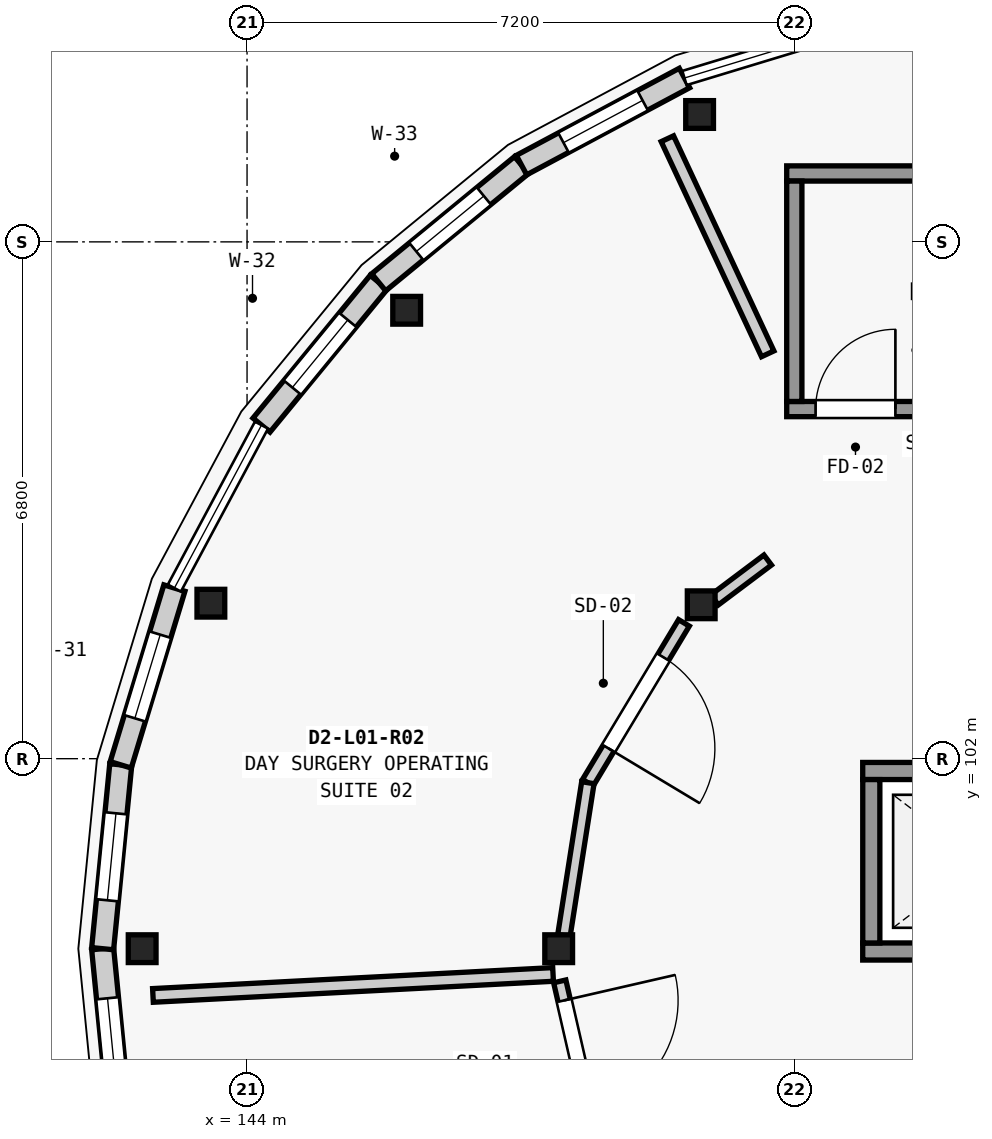
"""IFC4 building model, lengths in metres.
Left out: names, types, materials, properties, quantities, classifications, styles, units other than length and angle.
Written with IfcOpenShell. Run it as: python <this file> out.ifc"""

import sys

from ifc_helpers import new_model, si_unit, direction, frame, frame_2d, origin, origin_2d, place, context, subcontext, project, spatial, rectangle, extrude, element, fill, save


model = new_model("IFC4")
c1 = context("Model", 3, precision=1e-05, world=origin(), true_north=direction((0.0, 1.0)))
c2 = subcontext(c1, "Body", "Model", "MODEL_VIEW")
j1 = project(units=[si_unit("LENGTHUNIT", "METRE"), si_unit("PLANEANGLEUNIT", "RADIAN")], contexts=[c1])
p1 = place(None, origin())
s1 = spatial("IfcSite", under=j1, at=p1, CompositionType="ELEMENT")
p2 = place(p1, origin())
s2 = spatial("IfcBuilding", under=s1, at=p2, CompositionType="ELEMENT")
p3 = place(p2, frame((0.0, 0.0, 4.55)))
s3 = spatial("IfcBuildingStorey", under=s2, at=p3, CompositionType="ELEMENT", Elevation=4.55)
for number, where, z_axis, x_axis in (
    (1, (149.954, 110.476, 0.0), (0.0, 0.0, 1.0), (1.0, 0.0, 0.0)),
    (2, (146.1, 107.9, 0.0), (0.0, 0.0, 1.0), (1.0, 0.0, 0.0)),
    (3, (143.524, 104.046, 0.0), (0.0, 0.0, 1.0), (1.0, 0.0, 0.0)),
    (4, (142.62, 99.5, 0.0), (0.0, 0.0, 1.0), (1.0, 0.0, 0.0)),
    (5, (149.975, 104.025, 0.0), (0.0, 0.0, 1.0), (1.0, 0.0, 0.0)),
    (6, (148.1, 99.5, 0.0), (0.0, 0.0, 1.0), (1.0, 0.0, 0.0)),
):
    element("IfcColumn", number, at=place(p3, frame(where, z_axis=z_axis, x_axis=x_axis)), inside=s3, PredefinedType="COLUMN", context=c2, shape_type="SweptSolid", body=[
        extrude(rectangle(XDim=0.365, YDim=0.365, at=origin_2d()), origin(), (0.0, 0.0, 1.0), 4.2),
    ])
p4 = place(p3, frame((142.338, 97.081, 0.0), z_axis=(0.0, 0.0, 1.0), x_axis=(-0.097832820839, 0.995202863323, 0.0)))
e7 = element("IfcWall", 7, at=p4, inside=s3, PredefinedType="ELEMENTEDWALL", context=c2, shape_type="SweptSolid", body=[
    extrude(rectangle(XDim=2.431, YDim=0.29, at=frame_2d((1.215, 0.0))), origin(), (0.0, 0.0, 1.0), 3.309),
])
p5 = place(p4, frame((0.655, 0.0, 0.85)))
e8 = element("IfcOpeningElement", 8, at=p5, cuts=e7, PredefinedType="OPENING", context=c2, shape_type="SweptSolid", body=[
    extrude(rectangle(XDim=1.12, YDim=1.65, at=frame_2d((0.56, 0.825))), frame((0.0, 0.155, 0.0), z_axis=(0.0, -1.0, 0.0), x_axis=(1.0, 0.0, 0.0)), (0.0, 0.0, 1.0), 0.31),
])
p6 = place(p3, frame((142.1, 99.5, 0.0), z_axis=(0.0, 0.0, 1.0), x_axis=(0.097832820839, 0.995202863323, 0.0)))
e9 = element("IfcWall", 9, at=p6, inside=s3, PredefinedType="ELEMENTEDWALL", context=c2, shape_type="SweptSolid", body=[
    extrude(rectangle(XDim=2.431, YDim=0.29, at=frame_2d((1.215, 0.0))), origin(), (0.0, 0.0, 1.0), 3.309),
])
p7 = place(p6, frame((0.64, 0.0, 0.85)))
e10 = element("IfcOpeningElement", 10, at=p7, cuts=e9, PredefinedType="OPENING", context=c2, shape_type="SweptSolid", body=[
    extrude(rectangle(XDim=1.15, YDim=1.4, at=frame_2d((0.575, 0.7))), frame((0.0, 0.155, 0.0), z_axis=(0.0, -1.0, 0.0), x_axis=(1.0, 0.0, 0.0)), (0.0, 0.0, 1.0), 0.31),
])
p8 = place(p3, frame((142.338, 101.919, 0.0), z_axis=(0.0, 0.0, 1.0), x_axis=(0.290442193951, 0.956892539407, 0.0)))
e11 = element("IfcWall", 11, at=p8, inside=s3, PredefinedType="ELEMENTEDWALL", context=c2, shape_type="SweptSolid", body=[
    extrude(rectangle(XDim=2.431, YDim=0.29, at=frame_2d((1.215, 0.0))), origin(), (0.0, 0.0, 1.0), 3.309),
])
p9 = place(p8, frame((0.64, 0.0, 0.85)))
e12 = element("IfcOpeningElement", 12, at=p9, cuts=e11, PredefinedType="OPENING", context=c2, shape_type="SweptSolid", body=[
    extrude(rectangle(XDim=1.15, YDim=1.7, at=frame_2d((0.575, 0.85))), frame((0.0, 0.155, 0.0), z_axis=(0.0, -1.0, 0.0), x_axis=(1.0, 0.0, 0.0)), (0.0, 0.0, 1.0), 0.31),
])
p10 = place(p3, frame((144.19, 106.389, 0.0), z_axis=(0.0, 0.0, 1.0), x_axis=(0.634347392822, 0.773048113134, 0.0)))
e13 = element("IfcWall", 13, at=p10, inside=s3, PredefinedType="ELEMENTEDWALL", context=c2, shape_type="SweptSolid", body=[
    extrude(rectangle(XDim=2.431, YDim=0.29, at=frame_2d((1.215, 0.0))), origin(), (0.0, 0.0, 1.0), 3.309),
])
p11 = place(p10, frame((0.64, 0.0, 0.85)))
e14 = element("IfcOpeningElement", 14, at=p11, cuts=e13, PredefinedType="OPENING", context=c2, shape_type="SweptSolid", body=[
    extrude(rectangle(XDim=1.15, YDim=2.0, at=frame_2d((0.575, 1.0))), frame((0.0, 0.155, 0.0), z_axis=(0.0, -1.0, 0.0), x_axis=(1.0, 0.0, 0.0)), (0.0, 0.0, 1.0), 0.31),
])
p12 = place(p3, frame((145.732, 108.268, 0.0), z_axis=(0.0, 0.0, 1.0), x_axis=(0.773048113134, 0.634347392822, 0.0)))
e15 = element("IfcWall", 15, at=p12, inside=s3, PredefinedType="ELEMENTEDWALL", context=c2, shape_type="SweptSolid", body=[
    extrude(rectangle(XDim=2.431, YDim=0.29, at=frame_2d((1.215, 0.0))), origin(), (0.0, 0.0, 1.0), 3.309),
])
p13 = place(p12, frame((0.64, 0.0, 0.85)))
e16 = element("IfcOpeningElement", 16, at=p13, cuts=e15, PredefinedType="OPENING", context=c2, shape_type="SweptSolid", body=[
    extrude(rectangle(XDim=1.15, YDim=2.25, at=frame_2d((0.575, 1.125))), frame((0.0, 0.155, 0.0), z_axis=(0.0, -1.0, 0.0), x_axis=(1.0, 0.0, 0.0)), (0.0, 0.0, 1.0), 0.31),
])
p14 = place(p3, frame((147.611, 109.81, 0.0), z_axis=(0.0, 0.0, 1.0), x_axis=(0.881902152415, 0.471432490996, 0.0)))
e17 = element("IfcWall", 17, at=p14, inside=s3, PredefinedType="ELEMENTEDWALL", context=c2, shape_type="SweptSolid", body=[
    extrude(rectangle(XDim=2.431, YDim=0.29, at=frame_2d((1.215, 0.0))), origin(), (0.0, 0.0, 1.0), 3.309),
])
p15 = place(p14, frame((0.626, 0.0, 0.85)))
e18 = element("IfcOpeningElement", 18, at=p15, cuts=e17, PredefinedType="OPENING", context=c2, shape_type="SweptSolid", body=[
    extrude(rectangle(XDim=1.18, YDim=1.55, at=frame_2d((0.59, 0.775))), frame((0.0, 0.155, 0.0), z_axis=(0.0, -1.0, 0.0), x_axis=(1.0, 0.0, 0.0)), (0.0, 0.0, 1.0), 0.31),
])
p16 = place(p3, frame((151.1, 106.6, 0.0), z_axis=(0.0, 0.0, 1.0), x_axis=(1.0, 0.0, 0.0)))
e19 = element("IfcWall", 19, at=p16, inside=s3, PredefinedType="SHEAR", context=c2, shape_type="SweptSolid", body=[
    extrude(rectangle(XDim=6.8, YDim=0.2, at=frame_2d((3.4, 0.0))), origin(), (0.0, 0.0, 1.0), 3.955),
])
p17 = place(p16, frame((0.38, 0.0, 0.0)))
e20 = element("IfcOpeningElement", 20, at=p17, cuts=e19, PredefinedType="OPENING", context=c2, shape_type="SweptSolid", body=[
    extrude(rectangle(XDim=1.05, YDim=2.15, at=frame_2d((0.525, 1.075))), frame((0.0, 0.11, 0.0), z_axis=(0.0, -1.0, 0.0), x_axis=(1.0, 0.0, 0.0)), (0.0, 0.0, 1.0), 0.22),
])
p18 = place(p3, frame((151.1, 109.7, 0.0), z_axis=(0.0, 0.0, 1.0), x_axis=(1.0, 0.0, 0.0)))
e21 = element("IfcWall", 21, at=p18, inside=s3, PredefinedType="SHEAR", context=c2, shape_type="SweptSolid", body=[
    extrude(rectangle(XDim=6.8, YDim=0.2, at=frame_2d((3.4, 0.0))), origin(), (0.0, 0.0, 1.0), 3.955),
])
p19 = place(p3, frame((151.2, 106.7, 0.0), z_axis=(0.0, 0.0, 1.0), x_axis=(0.0, 1.0, 0.0)))
e22 = element("IfcWall", 22, at=p19, inside=s3, PredefinedType="SHEAR", context=c2, shape_type="SweptSolid", body=[
    extrude(rectangle(XDim=2.9, YDim=0.2, at=frame_2d((1.45, 0.0))), origin(), (0.0, 0.0, 1.0), 3.955),
])
p20 = place(p3, frame((152.1, 99.463, 0.0), z_axis=(0.0, 0.0, 1.0), x_axis=(1.0, 0.0, 0.0)))
e23 = element("IfcWall", 23, at=p20, inside=s3, PredefinedType="SHEAR", context=c2, shape_type="SweptSolid", body=[
    extrude(rectangle(XDim=3.1, YDim=0.225, at=frame_2d((1.55, 0.0))), origin(), (0.0, 0.0, 1.0), 3.955),
])
p21 = place(p20, frame((0.9, 0.0, 0.0)))
e24 = element("IfcOpeningElement", 24, at=p21, cuts=e23, PredefinedType="OPENING", context=c2, shape_type="SweptSolid", body=[
    extrude(rectangle(XDim=1.3, YDim=2.2, at=frame_2d((0.65, 1.1))), frame((0.0, 0.123, 0.0), z_axis=(0.0, -1.0, 0.0), x_axis=(1.0, 0.0, 0.0)), (0.0, 0.0, 1.0), 0.245),
])
p22 = place(p3, frame((152.1, 101.838, 0.0), z_axis=(0.0, 0.0, 1.0), x_axis=(1.0, 0.0, 0.0)))
e25 = element("IfcWall", 25, at=p22, inside=s3, PredefinedType="SHEAR", context=c2, shape_type="SweptSolid", body=[
    extrude(rectangle(XDim=3.1, YDim=0.225, at=frame_2d((1.55, 0.0))), origin(), (0.0, 0.0, 1.0), 3.955),
])
p23 = place(p3, frame((152.213, 99.575, 0.0), z_axis=(0.0, 0.0, 1.0), x_axis=(0.0, 1.0, 0.0)))
e26 = element("IfcWall", 26, at=p23, inside=s3, PredefinedType="SHEAR", context=c2, shape_type="SweptSolid", body=[
    extrude(rectangle(XDim=2.15, YDim=0.225, at=frame_2d((1.075, 0.0))), origin(), (0.0, 0.0, 1.0), 3.955),
])
p24 = place(p3, frame((150.85, 107.327, 0.0), z_axis=(0.0, 0.0, 1.0), x_axis=(-0.422718541288, 0.906261019162, 0.0)))
e27 = element("IfcWall", 27, at=p24, inside=s3, PredefinedType="PARTITIONING", context=c2, shape_type="SweptSolid", body=[
    extrude(rectangle(XDim=3.123, YDim=0.18, at=frame_2d((1.562, 0.0))), origin(), (0.0, 0.0, 1.0), 3.284),
])
p25 = place(p3, frame((148.026, 99.161, 0.0), z_axis=(0.0, 0.0, 1.0), x_axis=(-0.998629447921, -0.052337613105, 0.0)))
e28 = element("IfcWall", 28, at=p25, inside=s3, PredefinedType="PARTITIONING", context=c2, shape_type="SweptSolid", body=[
    extrude(rectangle(XDim=5.271, YDim=0.18, at=frame_2d((2.636, 0.0))), origin(), (0.0, 0.0, 1.0), 3.284),
])
p26 = place(p3, frame((150.85, 104.614, 0.0), z_axis=(0.0, 0.0, 1.0), x_axis=(-0.799731853613, -0.600357362174, 0.0)))
e29 = element("IfcWall", 29, at=p26, inside=s3, PredefinedType="PARTITIONING", context=c2, shape_type="SweptSolid", body=[
    extrude(rectangle(XDim=0.874, YDim=0.165, at=frame_2d((0.437, 0.0))), origin(), (0.0, 0.0, 1.0), 3.284),
])
p27 = place(p3, frame((149.748, 103.787, 0.0), z_axis=(0.0, 0.0, 1.0), x_axis=(-0.515197917959, -0.857071237022, 0.0)))
e30 = element("IfcWall", 30, at=p27, inside=s3, PredefinedType="PARTITIONING", context=c2, shape_type="SweptSolid", body=[
    extrude(rectangle(XDim=2.454, YDim=0.165, at=frame_2d((1.227, 0.0))), origin(), (0.0, 0.0, 1.0), 3.284),
])
p28 = place(p27, frame((0.527, 0.0, 0.0)))
e31 = element("IfcOpeningElement", 31, at=p28, cuts=e30, PredefinedType="OPENING", context=c2, shape_type="SweptSolid", body=[
    extrude(rectangle(XDim=1.4, YDim=2.25, at=frame_2d((0.7, 1.125))), frame((0.0, 0.093, 0.0), z_axis=(0.0, -1.0, 0.0), x_axis=(1.0, 0.0, 0.0)), (0.0, 0.0, 1.0), 0.185),
])
p29 = place(p3, frame((148.484, 101.684, 0.0), z_axis=(0.0, 0.0, 1.0), x_axis=(-0.154797832722, -0.98794616806, 0.0)))
e32 = element("IfcWall", 32, at=p29, inside=s3, PredefinedType="PARTITIONING", context=c2, shape_type="SweptSolid", body=[
    extrude(rectangle(XDim=2.034, YDim=0.165, at=frame_2d((1.017, 0.0))), origin(), (0.0, 0.0, 1.0), 3.284),
])
p30 = place(p3, frame((148.114, 99.07, 0.0), z_axis=(0.0, 0.0, 1.0), x_axis=(0.223512984269, -0.974700952017, 0.0)))
e33 = element("IfcWall", 33, at=p30, inside=s3, PredefinedType="PARTITIONING", context=c2, shape_type="SweptSolid", body=[
    extrude(rectangle(XDim=2.013, YDim=0.165, at=frame_2d((1.007, 0.0))), origin(), (0.0, 0.0, 1.0), 3.284),
])
p31 = place(p30, frame((0.257, 0.0, 0.0)))
e34 = element("IfcOpeningElement", 34, at=p31, cuts=e33, PredefinedType="OPENING", context=c2, shape_type="SweptSolid", body=[
    extrude(rectangle(XDim=1.5, YDim=2.3, at=frame_2d((0.75, 1.15))), frame((0.0, 0.093, 0.0), z_axis=(0.0, -1.0, 0.0), x_axis=(1.0, 0.0, 0.0)), (0.0, 0.0, 1.0), 0.185),
])
p32 = place(p5, origin())
e35 = element("IfcWindow", 35, at=p32, inside=s3, PartitioningType="SINGLE_PANEL", PredefinedType="WINDOW", context=c2, shape_type="SweptSolid", body=[
    extrude(rectangle(XDim=1.12, YDim=1.65, at=frame_2d((0.56, 0.825))), frame((0.0, 0.03, 0.0), z_axis=(0.0, -1.0, 0.0), x_axis=(1.0, 0.0, 0.0)), (0.0, 0.0, 1.0), 0.06),
])
fill(e8, e35)
p33 = place(p7, origin())
e36 = element("IfcWindow", 36, at=p33, inside=s3, PartitioningType="SINGLE_PANEL", PredefinedType="WINDOW", context=c2, shape_type="SweptSolid", body=[
    extrude(rectangle(XDim=1.15, YDim=1.4, at=frame_2d((0.575, 0.7))), frame((0.0, 0.03, 0.0), z_axis=(0.0, -1.0, 0.0), x_axis=(1.0, 0.0, 0.0)), (0.0, 0.0, 1.0), 0.06),
])
fill(e10, e36)
p34 = place(p9, origin())
e37 = element("IfcWindow", 37, at=p34, inside=s3, PartitioningType="SINGLE_PANEL", PredefinedType="WINDOW", context=c2, shape_type="SweptSolid", body=[
    extrude(rectangle(XDim=1.15, YDim=1.7, at=frame_2d((0.575, 0.85))), frame((0.0, 0.03, 0.0), z_axis=(0.0, -1.0, 0.0), x_axis=(1.0, 0.0, 0.0)), (0.0, 0.0, 1.0), 0.06),
])
fill(e12, e37)
p35 = place(p11, origin())
e38 = element("IfcWindow", 38, at=p35, inside=s3, PartitioningType="SINGLE_PANEL", PredefinedType="WINDOW", context=c2, shape_type="SweptSolid", body=[
    extrude(rectangle(XDim=1.15, YDim=2.0, at=frame_2d((0.575, 1.0))), frame((0.0, 0.03, 0.0), z_axis=(0.0, -1.0, 0.0), x_axis=(1.0, 0.0, 0.0)), (0.0, 0.0, 1.0), 0.06),
])
fill(e14, e38)
p36 = place(p13, origin())
e39 = element("IfcWindow", 39, at=p36, inside=s3, PartitioningType="SINGLE_PANEL", PredefinedType="WINDOW", context=c2, shape_type="SweptSolid", body=[
    extrude(rectangle(XDim=1.15, YDim=2.25, at=frame_2d((0.575, 1.125))), frame((0.0, 0.03, 0.0), z_axis=(0.0, -1.0, 0.0), x_axis=(1.0, 0.0, 0.0)), (0.0, 0.0, 1.0), 0.06),
])
fill(e16, e39)
p37 = place(p15, origin())
e40 = element("IfcWindow", 40, at=p37, inside=s3, PartitioningType="SINGLE_PANEL", PredefinedType="WINDOW", context=c2, shape_type="SweptSolid", body=[
    extrude(rectangle(XDim=1.18, YDim=1.55, at=frame_2d((0.59, 0.775))), frame((0.0, 0.03, 0.0), z_axis=(0.0, -1.0, 0.0), x_axis=(1.0, 0.0, 0.0)), (0.0, 0.0, 1.0), 0.06),
])
fill(e18, e40)
p38 = place(p17, origin())
e41 = element("IfcDoor", 41, at=p38, inside=s3, OperationType="SINGLE_SWING_RIGHT", PredefinedType="DOOR", context=c2, shape_type="SweptSolid", body=[
    extrude(rectangle(XDim=1.05, YDim=2.15, at=frame_2d((0.525, 1.075))), frame((0.0, 0.025, 0.0), z_axis=(0.0, -1.0, 0.0), x_axis=(1.0, 0.0, 0.0)), (0.0, 0.0, 1.0), 0.05),
])
fill(e20, e41)
p39 = place(p28, origin())
e42 = element("IfcDoor", 42, at=p39, inside=s3, OperationType="SINGLE_SWING_RIGHT", PredefinedType="DOOR", context=c2, shape_type="SweptSolid", body=[
    extrude(rectangle(XDim=1.4, YDim=2.25, at=frame_2d((0.7, 1.125))), frame((0.0, 0.025, 0.0), z_axis=(0.0, -1.0, 0.0), x_axis=(1.0, 0.0, 0.0)), (0.0, 0.0, 1.0), 0.05),
])
fill(e31, e42)
p40 = place(p31, origin())
e43 = element("IfcDoor", 43, at=p40, inside=s3, OperationType="SINGLE_SWING_LEFT", PredefinedType="DOOR", context=c2, shape_type="SweptSolid", body=[
    extrude(rectangle(XDim=1.5, YDim=2.3, at=frame_2d((0.75, 1.15))), frame((0.0, 0.025, 0.0), z_axis=(0.0, -1.0, 0.0), x_axis=(1.0, 0.0, 0.0)), (0.0, 0.0, 1.0), 0.05),
])
fill(e34, e43)
save(model, sys.argv[1])
